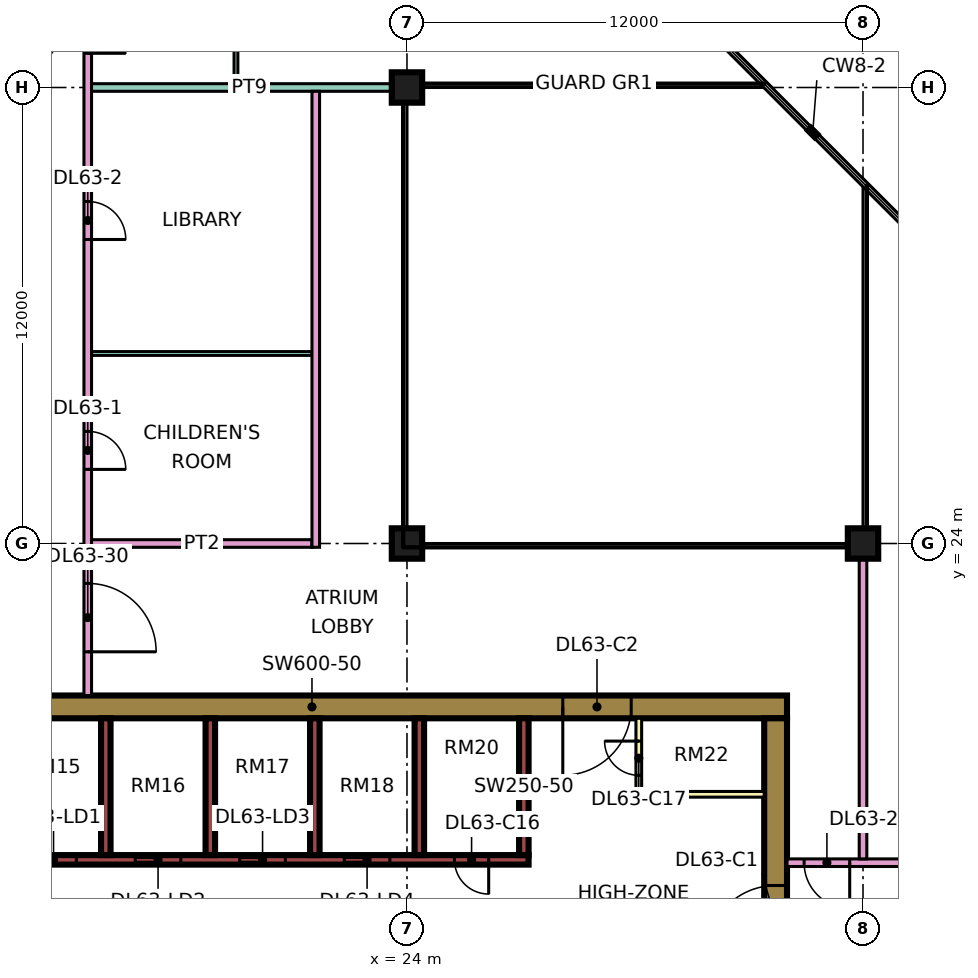
"""IFC4 building model, lengths in metres.
Left out: names, types, materials, properties, quantities, classifications, styles, units other than length and angle.
Written with IfcOpenShell. Run it as: python <this file> out.ifc"""

import sys

from ifc_helpers import new_model, si_unit, direction, frame, frame_2d, origin, origin_2d, place, context, subcontext, project, spatial, rectangle, extrude, element, fill, save


model = new_model("IFC4")
c1 = context("Model", 3, precision=1e-05, world=origin(), true_north=direction((0.0, 1.0)))
c2 = subcontext(c1, "Body", "Model", "MODEL_VIEW")
j1 = project(units=[si_unit("LENGTHUNIT", "METRE"), si_unit("PLANEANGLEUNIT", "RADIAN")], contexts=[c1])
p1 = place(None, origin())
s1 = spatial("IfcSite", under=j1, at=p1, CompositionType="ELEMENT")
p2 = place(p1, origin())
s2 = spatial("IfcBuilding", under=s1, at=p2, CompositionType="ELEMENT")
p3 = place(p2, frame((0.0, 0.0, 273.4)))
s3 = spatial("IfcBuildingStorey", under=s2, at=p3, CompositionType="ELEMENT", Elevation=273.4)
for number, where, z_axis, x_axis in (
    (1, (24.0, 24.0, 0.0), (0.0, 0.0, 1.0), (1.0, 0.0, 0.0)),
    (2, (24.0, 36.0, 0.0), (0.0, 0.0, 1.0), (1.0, 0.0, 0.0)),
    (3, (36.0, 24.0, 0.0), (0.0, 0.0, 1.0), (1.0, 0.0, 0.0)),
):
    element("IfcColumn", number, at=place(p3, frame(where, z_axis=z_axis, x_axis=x_axis)), inside=s3, PredefinedType="COLUMN", context=c2, shape_type="SweptSolid", body=[
        extrude(rectangle(XDim=0.8, YDim=0.8, at=origin_2d()), origin(), (0.0, 0.0, 1.0), 3.75),
    ])
p4 = place(p3, frame((9.0, 19.7, 0.0), z_axis=(0.0, 0.0, 1.0), x_axis=(1.0, 0.0, 0.0)))
e4 = element("IfcWall", 4, at=p4, inside=s3, PredefinedType="SHEAR", context=c2, shape_type="SweptSolid", body=[
    extrude(rectangle(XDim=25.0, YDim=0.6, at=frame_2d((12.5, 0.0))), origin(), (0.0, 0.0, 1.0), 3.75),
])
p5 = place(p4, frame((19.1, 0.0, 0.0)))
e5 = element("IfcOpeningElement", 5, at=p5, cuts=e4, PredefinedType="OPENING", context=c2, shape_type="SweptSolid", body=[
    extrude(rectangle(XDim=1.8, YDim=2.4, at=frame_2d((0.9, 1.2))), frame((0.0, 0.31, 0.0), z_axis=(0.0, -1.0, 0.0), x_axis=(1.0, 0.0, 0.0)), (0.0, 0.0, 1.0), 0.62),
])
p6 = place(p3, frame((33.7, 7.6, 0.0), z_axis=(0.0, 0.0, 1.0), x_axis=(0.0, 1.0, 0.0)))
e6 = element("IfcWall", 6, at=p6, inside=s3, PredefinedType="SHEAR", context=c2, shape_type="SweptSolid", body=[
    extrude(rectangle(XDim=11.8, YDim=0.6, at=frame_2d((5.9, 0.0))), origin(), (0.0, 0.0, 1.0), 3.75),
])
p7 = place(p6, frame((5.6, 0.0, 0.0)))
e7 = element("IfcOpeningElement", 7, at=p7, cuts=e6, PredefinedType="OPENING", context=c2, shape_type="SweptSolid", body=[
    extrude(rectangle(XDim=1.8, YDim=2.4, at=frame_2d((0.9, 1.2))), frame((0.0, 0.31, 0.0), z_axis=(0.0, -1.0, 0.0), x_axis=(1.0, 0.0, 0.0)), (0.0, 0.0, 1.0), 0.62),
])
p8 = place(p3, frame((13.45, 15.675, 0.0), z_axis=(0.0, 0.0, 1.0), x_axis=(1.0, 0.0, 0.0)))
e8 = element("IfcWall", 8, at=p8, inside=s3, PredefinedType="SHEAR", context=c2, shape_type="SweptSolid", body=[
    extrude(rectangle(XDim=13.75, YDim=0.25, at=frame_2d((6.875, 0.0))), origin(), (0.0, 0.0, 1.0), 3.75),
])
p9 = place(p8, frame((0.65, 0.0, 0.0)))
e9 = element("IfcOpeningElement", 9, at=p9, cuts=e8, PredefinedType="OPENING", context=c2, shape_type="SweptSolid", body=[
    extrude(rectangle(XDim=1.2, YDim=2.2, at=frame_2d((0.6, 1.1))), frame((0.0, 0.135, 0.0), z_axis=(0.0, -1.0, 0.0), x_axis=(1.0, 0.0, 0.0)), (0.0, 0.0, 1.0), 0.27),
])
p10 = place(p8, frame((3.4, 0.0, 0.0)))
e10 = element("IfcOpeningElement", 10, at=p10, cuts=e8, PredefinedType="OPENING", context=c2, shape_type="SweptSolid", body=[
    extrude(rectangle(XDim=1.2, YDim=2.2, at=frame_2d((0.6, 1.1))), frame((0.0, 0.135, 0.0), z_axis=(0.0, -1.0, 0.0), x_axis=(1.0, 0.0, 0.0)), (0.0, 0.0, 1.0), 0.27),
])
p11 = place(p8, frame((6.15, 0.0, 0.0)))
e11 = element("IfcOpeningElement", 11, at=p11, cuts=e8, PredefinedType="OPENING", context=c2, shape_type="SweptSolid", body=[
    extrude(rectangle(XDim=1.2, YDim=2.2, at=frame_2d((0.6, 1.1))), frame((0.0, 0.135, 0.0), z_axis=(0.0, -1.0, 0.0), x_axis=(1.0, 0.0, 0.0)), (0.0, 0.0, 1.0), 0.27),
])
p12 = place(p8, frame((8.9, 0.0, 0.0)))
e12 = element("IfcOpeningElement", 12, at=p12, cuts=e8, PredefinedType="OPENING", context=c2, shape_type="SweptSolid", body=[
    extrude(rectangle(XDim=1.2, YDim=2.2, at=frame_2d((0.6, 1.1))), frame((0.0, 0.135, 0.0), z_axis=(0.0, -1.0, 0.0), x_axis=(1.0, 0.0, 0.0)), (0.0, 0.0, 1.0), 0.27),
])
p13 = place(p8, frame((11.8, 0.0, 0.0)))
e13 = element("IfcOpeningElement", 13, at=p13, cuts=e8, PredefinedType="OPENING", context=c2, shape_type="SweptSolid", body=[
    extrude(rectangle(XDim=0.9, YDim=2.1, at=frame_2d((0.45, 1.05))), frame((0.0, 0.135, 0.0), z_axis=(0.0, -1.0, 0.0), x_axis=(1.0, 0.0, 0.0)), (0.0, 0.0, 1.0), 0.27),
])
for number, where, z_axis, x_axis in (
    (14, (16.075, 15.8, 0.0), (0.0, 0.0, 1.0), (0.0, 1.0, 0.0)),
    (15, (18.825, 15.8, 0.0), (0.0, 0.0, 1.0), (0.0, 1.0, 0.0)),
    (16, (21.575, 15.8, 0.0), (0.0, 0.0, 1.0), (0.0, 1.0, 0.0)),
    (17, (24.325, 15.8, 0.0), (0.0, 0.0, 1.0), (0.0, 1.0, 0.0)),
    (18, (27.075, 15.8, 0.0), (0.0, 0.0, 1.0), (0.0, 1.0, 0.0)),
):
    element("IfcWall", number, at=place(p3, frame(where, z_axis=z_axis, x_axis=x_axis)), inside=s3, PredefinedType="SHEAR", context=c2, shape_type="SweptSolid", body=[
        extrude(rectangle(XDim=3.6, YDim=0.25, at=frame_2d((1.8, 0.0))), origin(), (0.0, 0.0, 1.0), 3.75),
    ])
p14 = place(p3, frame((30.1, 17.4, 0.0), z_axis=(0.0, 0.0, 1.0), x_axis=(0.0, 1.0, 0.0)))
e19 = element("IfcWall", 19, at=p14, inside=s3, PredefinedType="PARTITIONING", context=c2, shape_type="SweptSolid", body=[
    extrude(rectangle(XDim=2.0, YDim=0.15, at=frame_2d((1.0, 0.0))), origin(), (0.0, 0.0, 1.0), 3.35),
])
p15 = place(p14, frame((0.5, 0.0, 0.0)))
e20 = element("IfcOpeningElement", 20, at=p15, cuts=e19, PredefinedType="OPENING", context=c2, shape_type="SweptSolid", body=[
    extrude(rectangle(XDim=0.9, YDim=2.1, at=frame_2d((0.45, 1.05))), frame((0.0, 0.085, 0.0), z_axis=(0.0, -1.0, 0.0), x_axis=(1.0, 0.0, 0.0)), (0.0, 0.0, 1.0), 0.17),
])
p16 = place(p3, frame((30.1, 17.4, 0.0), z_axis=(0.0, 0.0, 1.0), x_axis=(1.0, 0.0, 0.0)))
e21 = element("IfcWall", 21, at=p16, inside=s3, PredefinedType="PARTITIONING", context=c2, shape_type="SweptSolid", body=[
    extrude(rectangle(XDim=3.3, YDim=0.15, at=frame_2d((1.65, 0.0))), origin(), (0.0, 0.0, 1.0), 3.35),
])
p17 = place(p3, frame((15.6, 20.0, 0.0), z_axis=(0.0, 0.0, 1.0), x_axis=(0.0, 1.0, 0.0)))
e22 = element("IfcWall", 22, at=p17, inside=s3, PredefinedType="PARTITIONING", context=c2, shape_type="SweptSolid", body=[
    extrude(rectangle(XDim=27.775, YDim=0.2, at=frame_2d((13.887, 0.0))), origin(), (0.0, 0.0, 1.0), 3.35),
])
p18 = place(p17, frame((5.95, 0.0, 0.0)))
e23 = element("IfcOpeningElement", 23, at=p18, cuts=e22, PredefinedType="OPENING", context=c2, shape_type="SweptSolid", body=[
    extrude(rectangle(XDim=1.0, YDim=2.1, at=frame_2d((0.5, 1.05))), frame((0.0, 0.11, 0.0), z_axis=(0.0, -1.0, 0.0), x_axis=(1.0, 0.0, 0.0)), (0.0, 0.0, 1.0), 0.22),
])
p19 = place(p17, frame((12.0, 0.0, 0.0)))
e24 = element("IfcOpeningElement", 24, at=p19, cuts=e22, PredefinedType="OPENING", context=c2, shape_type="SweptSolid", body=[
    extrude(rectangle(XDim=1.0, YDim=2.1, at=frame_2d((0.5, 1.05))), frame((0.0, 0.11, 0.0), z_axis=(0.0, -1.0, 0.0), x_axis=(1.0, 0.0, 0.0)), (0.0, 0.0, 1.0), 0.22),
])
p20 = place(p17, frame((16.9, 0.0, 0.0)))
e25 = element("IfcOpeningElement", 25, at=p20, cuts=e22, PredefinedType="OPENING", context=c2, shape_type="SweptSolid", body=[
    extrude(rectangle(XDim=1.0, YDim=2.1, at=frame_2d((0.5, 1.05))), frame((0.0, 0.11, 0.0), z_axis=(0.0, -1.0, 0.0), x_axis=(1.0, 0.0, 0.0)), (0.0, 0.0, 1.0), 0.22),
])
p21 = place(p17, frame((1.15, 0.0, 0.0)))
e26 = element("IfcOpeningElement", 26, at=p21, cuts=e22, PredefinedType="OPENING", context=c2, shape_type="SweptSolid", body=[
    extrude(rectangle(XDim=1.8, YDim=2.1, at=frame_2d((0.9, 1.05))), frame((0.0, 0.11, 0.0), z_axis=(0.0, -1.0, 0.0), x_axis=(1.0, 0.0, 0.0)), (0.0, 0.0, 1.0), 0.22),
])
p22 = place(p17, frame((25.9, 0.0, 0.0)))
e27 = element("IfcOpeningElement", 27, at=p22, cuts=e22, PredefinedType="OPENING", context=c2, shape_type="SweptSolid", body=[
    extrude(rectangle(XDim=1.0, YDim=2.1, at=frame_2d((0.5, 1.05))), frame((0.0, 0.11, 0.0), z_axis=(0.0, -1.0, 0.0), x_axis=(1.0, 0.0, 0.0)), (0.0, 0.0, 1.0), 0.22),
])
p23 = place(p3, frame((15.7, 24.0, 0.0), z_axis=(0.0, 0.0, 1.0), x_axis=(1.0, 0.0, 0.0)))
e28 = element("IfcWall", 28, at=p23, inside=s3, PredefinedType="PARTITIONING", context=c2, shape_type="SweptSolid", body=[
    extrude(rectangle(XDim=5.8, YDim=0.2, at=frame_2d((2.9, 0.0))), origin(), (0.0, 0.0, 1.0), 3.35),
])
p24 = place(p3, frame((15.7, 29.0, 0.0), z_axis=(0.0, 0.0, 1.0), x_axis=(1.0, 0.0, 0.0)))
e29 = element("IfcWall", 29, at=p24, inside=s3, PredefinedType="PARTITIONING", context=c2, shape_type="SweptSolid", body=[
    extrude(rectangle(XDim=5.8, YDim=0.1, at=frame_2d((2.9, 0.0))), origin(), (0.0, 0.0, 1.0), 3.35),
])
p25 = place(p3, frame((15.7, 36.0, 0.0), z_axis=(0.0, 0.0, 1.0), x_axis=(1.0, 0.0, 0.0)))
e30 = element("IfcWall", 30, at=p25, inside=s3, PredefinedType="PARTITIONING", context=c2, shape_type="SweptSolid", body=[
    extrude(rectangle(XDim=8.3, YDim=0.2, at=frame_2d((4.15, 0.0))), origin(), (0.0, 0.0, 1.0), 3.35),
])
p26 = place(p3, frame((19.5, 36.1, 0.0), z_axis=(0.0, 0.0, 1.0), x_axis=(0.0, 1.0, 0.0)))
e31 = element("IfcWall", 31, at=p26, inside=s3, PredefinedType="PARTITIONING", context=c2, shape_type="SweptSolid", body=[
    extrude(rectangle(XDim=2.85, YDim=0.1, at=frame_2d((1.425, 0.0))), origin(), (0.0, 0.0, 1.0), 3.35),
])
p27 = place(p26, frame((0.95, 0.0, 0.0)))
e32 = element("IfcOpeningElement", 32, at=p27, cuts=e31, PredefinedType="OPENING", context=c2, shape_type="SweptSolid", body=[
    extrude(rectangle(XDim=0.9, YDim=2.1, at=frame_2d((0.45, 1.05))), frame((0.0, 0.06, 0.0), z_axis=(0.0, -1.0, 0.0), x_axis=(1.0, 0.0, 0.0)), (0.0, 0.0, 1.0), 0.12),
])
p28 = place(p3, frame((21.6, 23.9, 0.0), z_axis=(0.0, 0.0, 1.0), x_axis=(0.0, 1.0, 0.0)))
e33 = element("IfcWall", 33, at=p28, inside=s3, PredefinedType="PARTITIONING", context=c2, shape_type="SweptSolid", body=[
    extrude(rectangle(XDim=12.0, YDim=0.2, at=frame_2d((6.0, 0.0))), origin(), (0.0, 0.0, 1.0), 3.35),
])
p29 = place(p3, frame((34.0, 15.6, 0.0), z_axis=(0.0, 0.0, 1.0), x_axis=(1.0, 0.0, 0.0)))
e34 = element("IfcWall", 34, at=p29, inside=s3, PredefinedType="PARTITIONING", context=c2, shape_type="SweptSolid", body=[
    extrude(rectangle(XDim=10.35, YDim=0.2, at=frame_2d((5.175, 0.0))), origin(), (0.0, 0.0, 1.0), 3.35),
])
p30 = place(p29, frame((5.6, 0.0, 0.0)))
e35 = element("IfcOpeningElement", 35, at=p30, cuts=e34, PredefinedType="OPENING", context=c2, shape_type="SweptSolid", body=[
    extrude(rectangle(XDim=1.0, YDim=2.1, at=frame_2d((0.5, 1.05))), frame((0.0, 0.11, 0.0), z_axis=(0.0, -1.0, 0.0), x_axis=(1.0, 0.0, 0.0)), (0.0, 0.0, 1.0), 0.22),
])
p31 = place(p29, frame((0.45, 0.0, 0.0)))
e36 = element("IfcOpeningElement", 36, at=p31, cuts=e34, PredefinedType="OPENING", context=c2, shape_type="SweptSolid", body=[
    extrude(rectangle(XDim=1.2, YDim=2.1, at=frame_2d((0.6, 1.05))), frame((0.0, 0.11, 0.0), z_axis=(0.0, -1.0, 0.0), x_axis=(1.0, 0.0, 0.0)), (0.0, 0.0, 1.0), 0.22),
])
p32 = place(p3, frame((36.0, 15.7, 0.0), z_axis=(0.0, 0.0, 1.0), x_axis=(0.0, 1.0, 0.0)))
e37 = element("IfcWall", 37, at=p32, inside=s3, PredefinedType="PARTITIONING", context=c2, shape_type="SweptSolid", body=[
    extrude(rectangle(XDim=8.3, YDim=0.2, at=frame_2d((4.15, 0.0))), origin(), (0.0, 0.0, 1.0), 3.35),
])
p33 = place(p9, origin())
e38 = element("IfcDoor", 38, at=p33, inside=s3, OperationType="DOUBLE_DOOR_SLIDING", PredefinedType="DOOR", context=c2, shape_type="SweptSolid", body=[
    extrude(rectangle(XDim=1.2, YDim=2.2, at=frame_2d((0.6, 1.1))), frame((0.0, 0.025, 0.0), z_axis=(0.0, -1.0, 0.0), x_axis=(1.0, 0.0, 0.0)), (0.0, 0.0, 1.0), 0.05),
])
fill(e9, e38)
p34 = place(p10, origin())
e39 = element("IfcDoor", 39, at=p34, inside=s3, OperationType="DOUBLE_DOOR_SLIDING", PredefinedType="DOOR", context=c2, shape_type="SweptSolid", body=[
    extrude(rectangle(XDim=1.2, YDim=2.2, at=frame_2d((0.6, 1.1))), frame((0.0, 0.025, 0.0), z_axis=(0.0, -1.0, 0.0), x_axis=(1.0, 0.0, 0.0)), (0.0, 0.0, 1.0), 0.05),
])
fill(e10, e39)
p35 = place(p11, origin())
e40 = element("IfcDoor", 40, at=p35, inside=s3, OperationType="DOUBLE_DOOR_SLIDING", PredefinedType="DOOR", context=c2, shape_type="SweptSolid", body=[
    extrude(rectangle(XDim=1.2, YDim=2.2, at=frame_2d((0.6, 1.1))), frame((0.0, 0.025, 0.0), z_axis=(0.0, -1.0, 0.0), x_axis=(1.0, 0.0, 0.0)), (0.0, 0.0, 1.0), 0.05),
])
fill(e11, e40)
p36 = place(p12, origin())
e41 = element("IfcDoor", 41, at=p36, inside=s3, OperationType="DOUBLE_DOOR_SLIDING", PredefinedType="DOOR", context=c2, shape_type="SweptSolid", body=[
    extrude(rectangle(XDim=1.2, YDim=2.2, at=frame_2d((0.6, 1.1))), frame((0.0, 0.025, 0.0), z_axis=(0.0, -1.0, 0.0), x_axis=(1.0, 0.0, 0.0)), (0.0, 0.0, 1.0), 0.05),
])
fill(e12, e41)
p37 = place(p7, origin())
e42 = element("IfcDoor", 42, at=p37, inside=s3, OperationType="DOUBLE_DOOR_SINGLE_SWING", PredefinedType="DOOR", context=c2, shape_type="SweptSolid", body=[
    extrude(rectangle(XDim=1.8, YDim=2.4, at=frame_2d((0.9, 1.2))), frame((0.0, 0.025, 0.0), z_axis=(0.0, -1.0, 0.0), x_axis=(1.0, 0.0, 0.0)), (0.0, 0.0, 1.0), 0.05),
])
fill(e7, e42)
p38 = place(p5, frame((1.8, 0.0, 0.0), z_axis=(0.0, 0.0, 1.0), x_axis=(-1.0, 0.0, 0.0)))
e43 = element("IfcDoor", 43, at=p38, inside=s3, OperationType="DOUBLE_DOOR_SINGLE_SWING", PredefinedType="DOOR", context=c2, shape_type="SweptSolid", body=[
    extrude(rectangle(XDim=1.8, YDim=2.4, at=frame_2d((0.9, 1.2))), frame((0.0, 0.025, 0.0), z_axis=(0.0, -1.0, 0.0), x_axis=(1.0, 0.0, 0.0)), (0.0, 0.0, 1.0), 0.05),
])
fill(e5, e43)
p39 = place(p13, origin())
e44 = element("IfcDoor", 44, at=p39, inside=s3, OperationType="SINGLE_SWING_RIGHT", PredefinedType="DOOR", context=c2, shape_type="SweptSolid", body=[
    extrude(rectangle(XDim=0.9, YDim=2.1, at=frame_2d((0.45, 1.05))), frame((0.0, 0.025, 0.0), z_axis=(0.0, -1.0, 0.0), x_axis=(1.0, 0.0, 0.0)), (0.0, 0.0, 1.0), 0.05),
])
fill(e13, e44)
p40 = place(p15, frame((0.9, 0.0, 0.0), z_axis=(0.0, 0.0, 1.0), x_axis=(-1.0, 0.0, 0.0)))
e45 = element("IfcDoor", 45, at=p40, inside=s3, OperationType="SINGLE_SWING_RIGHT", PredefinedType="DOOR", context=c2, shape_type="SweptSolid", body=[
    extrude(rectangle(XDim=0.9, YDim=2.1, at=frame_2d((0.45, 1.05))), frame((0.0, 0.025, 0.0), z_axis=(0.0, -1.0, 0.0), x_axis=(1.0, 0.0, 0.0)), (0.0, 0.0, 1.0), 0.05),
])
fill(e20, e45)
p41 = place(p18, frame((1.0, 0.0, 0.0), z_axis=(0.0, 0.0, 1.0), x_axis=(-1.0, 0.0, 0.0)))
e46 = element("IfcDoor", 46, at=p41, inside=s3, OperationType="SINGLE_SWING_LEFT", PredefinedType="DOOR", context=c2, shape_type="SweptSolid", body=[
    extrude(rectangle(XDim=1.0, YDim=2.1, at=frame_2d((0.5, 1.05))), frame((0.0, 0.025, 0.0), z_axis=(0.0, -1.0, 0.0), x_axis=(1.0, 0.0, 0.0)), (0.0, 0.0, 1.0), 0.05),
])
fill(e23, e46)
p42 = place(p19, frame((1.0, 0.0, 0.0), z_axis=(0.0, 0.0, 1.0), x_axis=(-1.0, 0.0, 0.0)))
e47 = element("IfcDoor", 47, at=p42, inside=s3, OperationType="SINGLE_SWING_LEFT", PredefinedType="DOOR", context=c2, shape_type="SweptSolid", body=[
    extrude(rectangle(XDim=1.0, YDim=2.1, at=frame_2d((0.5, 1.05))), frame((0.0, 0.025, 0.0), z_axis=(0.0, -1.0, 0.0), x_axis=(1.0, 0.0, 0.0)), (0.0, 0.0, 1.0), 0.05),
])
fill(e24, e47)
p43 = place(p20, frame((1.0, 0.0, 0.0), z_axis=(0.0, 0.0, 1.0), x_axis=(-1.0, 0.0, 0.0)))
e48 = element("IfcDoor", 48, at=p43, inside=s3, OperationType="SINGLE_SWING_LEFT", PredefinedType="DOOR", context=c2, shape_type="SweptSolid", body=[
    extrude(rectangle(XDim=1.0, YDim=2.1, at=frame_2d((0.5, 1.05))), frame((0.0, 0.025, 0.0), z_axis=(0.0, -1.0, 0.0), x_axis=(1.0, 0.0, 0.0)), (0.0, 0.0, 1.0), 0.05),
])
fill(e25, e48)
p44 = place(p31, origin())
e49 = element("IfcDoor", 49, at=p44, inside=s3, OperationType="SINGLE_SWING_RIGHT", PredefinedType="DOOR", context=c2, shape_type="SweptSolid", body=[
    extrude(rectangle(XDim=1.2, YDim=2.1, at=frame_2d((0.6, 1.05))), frame((0.0, 0.025, 0.0), z_axis=(0.0, -1.0, 0.0), x_axis=(1.0, 0.0, 0.0)), (0.0, 0.0, 1.0), 0.05),
])
fill(e36, e49)
p45 = place(p21, frame((1.8, 0.0, 0.0), z_axis=(0.0, 0.0, 1.0), x_axis=(-1.0, 0.0, 0.0)))
e50 = element("IfcDoor", 50, at=p45, inside=s3, OperationType="DOUBLE_DOOR_SINGLE_SWING", PredefinedType="DOOR", context=c2, shape_type="SweptSolid", body=[
    extrude(rectangle(XDim=1.8, YDim=2.1, at=frame_2d((0.9, 1.05))), frame((0.0, 0.025, 0.0), z_axis=(0.0, -1.0, 0.0), x_axis=(1.0, 0.0, 0.0)), (0.0, 0.0, 1.0), 0.05),
])
fill(e26, e50)
save(model, sys.argv[1])
